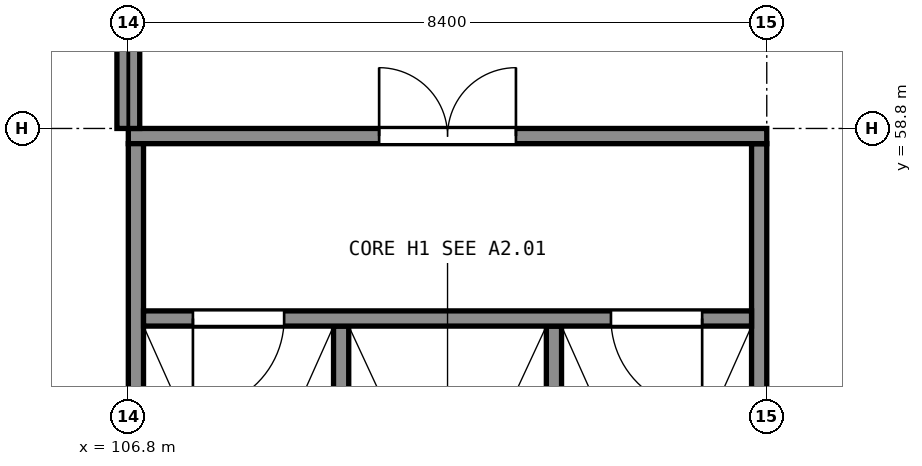
"""IFC4 building model, lengths in metres.
Left out: names, types, materials, properties, quantities, classifications, styles, units other than length and angle.
Written with IfcOpenShell. Run it as: python <this file> out.ifc"""

import sys

from ifc_helpers import new_model, si_unit, direction, frame, frame_2d, origin, place, context, subcontext, project, spatial, polyline, rectangle, outline, extrude, element, fill, save


model = new_model("IFC4")
c1 = context("Model", 3, precision=1e-05, world=origin(), true_north=direction((0.0, 1.0)))
c2 = subcontext(c1, "Body", "Model", "MODEL_VIEW")
j1 = project(units=[si_unit("LENGTHUNIT", "METRE"), si_unit("PLANEANGLEUNIT", "RADIAN")], contexts=[c1])
p1 = place(None, origin())
s1 = spatial("IfcSite", under=j1, at=p1, CompositionType="ELEMENT")
p2 = place(p1, origin())
s2 = spatial("IfcBuilding", under=s1, at=p2, CompositionType="ELEMENT")
p3 = place(p2, frame((0.0, 0.0, 25.0)))
s3 = spatial("IfcBuildingStorey", under=s2, at=p3, CompositionType="ELEMENT", Elevation=25.0)
p4 = place(p3, frame((106.8, 58.7, 0.0), z_axis=(0.0, 0.0, 1.0), x_axis=(1.0, 0.0, 0.0)))
e1 = element("IfcWall", 1, at=p4, inside=s3, PredefinedType="SHEAR", context=c2, shape_type="SweptSolid", body=[
    extrude(rectangle(XDim=8.4, YDim=0.2, at=frame_2d((4.2, 0.0))), origin(), (0.0, 0.0, 1.0), 14.47),
])
p5 = place(p4, frame((3.3, 0.0, 0.0)))
e2 = element("IfcOpeningElement", 2, at=p5, cuts=e1, PredefinedType="OPENING", context=c2, shape_type="SweptSolid", body=[
    extrude(rectangle(XDim=1.8, YDim=2.1, at=frame_2d((0.9, 1.05))), frame((0.0, 0.11, 0.0), z_axis=(0.0, -1.0, 0.0), x_axis=(1.0, 0.0, 0.0)), (0.0, 0.0, 1.0), 0.22),
])
for number, where, z_axis, x_axis in (
    (3, (106.9, 50.6, 0.0), (0.0, 0.0, 1.0), (0.0, 1.0, 0.0)),
    (4, (115.1, 50.6, 0.0), (0.0, 0.0, 1.0), (0.0, 1.0, 0.0)),
):
    element("IfcWall", number, at=place(p3, frame(where, z_axis=z_axis, x_axis=x_axis)), inside=s3, PredefinedType="SHEAR", context=c2, shape_type="SweptSolid", body=[
        extrude(rectangle(XDim=8.0, YDim=0.2, at=frame_2d((4.0, 0.0))), origin(), (0.0, 0.0, 1.0), 14.47),
    ])
p6 = place(p3, frame((107.0, 56.3, 0.0), z_axis=(0.0, 0.0, 1.0), x_axis=(1.0, 0.0, 0.0)))
e5 = element("IfcWall", 5, at=p6, inside=s3, PredefinedType="SHEAR", context=c2, shape_type="SweptSolid", body=[
    extrude(rectangle(XDim=8.0, YDim=0.2, at=frame_2d((4.0, 0.0))), origin(), (0.0, 0.0, 1.0), 14.47),
])
p7 = place(p6, frame((0.65, 0.0, 0.0)))
e6 = element("IfcOpeningElement", 6, at=p7, cuts=e5, PredefinedType="OPENING", context=c2, shape_type="SweptSolid", body=[
    extrude(rectangle(XDim=1.2, YDim=2.1, at=frame_2d((0.6, 1.05))), frame((0.0, 0.11, 0.0), z_axis=(0.0, -1.0, 0.0), x_axis=(1.0, 0.0, 0.0)), (0.0, 0.0, 1.0), 0.22),
])
p8 = place(p6, frame((6.15, 0.0, 0.0)))
e7 = element("IfcOpeningElement", 7, at=p8, cuts=e5, PredefinedType="OPENING", context=c2, shape_type="SweptSolid", body=[
    extrude(rectangle(XDim=1.2, YDim=2.1, at=frame_2d((0.6, 1.05))), frame((0.0, 0.11, 0.0), z_axis=(0.0, -1.0, 0.0), x_axis=(1.0, 0.0, 0.0)), (0.0, 0.0, 1.0), 0.22),
])
for number, where, z_axis, x_axis in (
    (8, (109.6, 50.6, 0.0), (0.0, 0.0, 1.0), (0.0, 1.0, 0.0)),
    (9, (112.4, 50.6, 0.0), (0.0, 0.0, 1.0), (0.0, 1.0, 0.0)),
):
    element("IfcWall", number, at=place(p3, frame(where, z_axis=z_axis, x_axis=x_axis)), inside=s3, PredefinedType="SHEAR", context=c2, shape_type="SweptSolid", body=[
        extrude(rectangle(XDim=5.6, YDim=0.2, at=frame_2d((2.8, 0.0))), origin(), (0.0, 0.0, 1.0), 14.47),
    ])
p9 = place(p3, frame((106.8, 58.8, 0.0), z_axis=(0.0, 0.0, 1.0), x_axis=(0.0, 1.0, 0.0)))
e10 = element("IfcWall", 10, at=p9, inside=s3, PredefinedType="SOLIDWALL", context=c2, shape_type="SweptSolid", body=[
    extrude(outline(polyline([(0.0, 0.0), (8.4, 0.0), (8.4, 13.06), (0.0, 12.361), (0.0, 0.0)])), frame((0.0, 0.15, 0.0), z_axis=(0.0, -1.0, 0.0), x_axis=(1.0, 0.0, 0.0)), (0.0, 0.0, 1.0), 0.3),
])
p10 = place(p9, frame((2.5, 0.0, 1.5)))
e11 = element("IfcOpeningElement", 11, at=p10, cuts=e10, PredefinedType="OPENING", context=c2, shape_type="SweptSolid", body=[
    extrude(rectangle(XDim=0.6, YDim=2.4, at=frame_2d((0.3, 1.2))), frame((0.0, 0.16, 0.0), z_axis=(0.0, -1.0, 0.0), x_axis=(1.0, 0.0, 0.0)), (0.0, 0.0, 1.0), 0.32),
])
p11 = place(p9, frame((5.3, 0.0, 1.5)))
e12 = element("IfcOpeningElement", 12, at=p11, cuts=e10, PredefinedType="OPENING", context=c2, shape_type="SweptSolid", body=[
    extrude(rectangle(XDim=0.6, YDim=2.4, at=frame_2d((0.3, 1.2))), frame((0.0, 0.16, 0.0), z_axis=(0.0, -1.0, 0.0), x_axis=(1.0, 0.0, 0.0)), (0.0, 0.0, 1.0), 0.32),
])
p12 = place(p5, origin())
e13 = element("IfcDoor", 13, at=p12, inside=s3, OperationType="DOUBLE_DOOR_SINGLE_SWING", PredefinedType="DOOR", context=c2, shape_type="SweptSolid", body=[
    extrude(rectangle(XDim=1.8, YDim=2.1, at=frame_2d((0.9, 1.05))), frame((0.0, 0.025, 0.0), z_axis=(0.0, -1.0, 0.0), x_axis=(1.0, 0.0, 0.0)), (0.0, 0.0, 1.0), 0.05),
])
fill(e2, e13)
p13 = place(p7, origin())
e14 = element("IfcDoor", 14, at=p13, inside=s3, OperationType="SINGLE_SWING_LEFT", PredefinedType="DOOR", context=c2, shape_type="SweptSolid", body=[
    extrude(rectangle(XDim=1.2, YDim=2.1, at=frame_2d((0.6, 1.05))), frame((0.0, 0.025, 0.0), z_axis=(0.0, -1.0, 0.0), x_axis=(1.0, 0.0, 0.0)), (0.0, 0.0, 1.0), 0.05),
])
fill(e6, e14)
p14 = place(p8, origin())
e15 = element("IfcDoor", 15, at=p14, inside=s3, OperationType="SINGLE_SWING_RIGHT", PredefinedType="DOOR", context=c2, shape_type="SweptSolid", body=[
    extrude(rectangle(XDim=1.2, YDim=2.1, at=frame_2d((0.6, 1.05))), frame((0.0, 0.025, 0.0), z_axis=(0.0, -1.0, 0.0), x_axis=(1.0, 0.0, 0.0)), (0.0, 0.0, 1.0), 0.05),
])
fill(e7, e15)
save(model, sys.argv[1])
